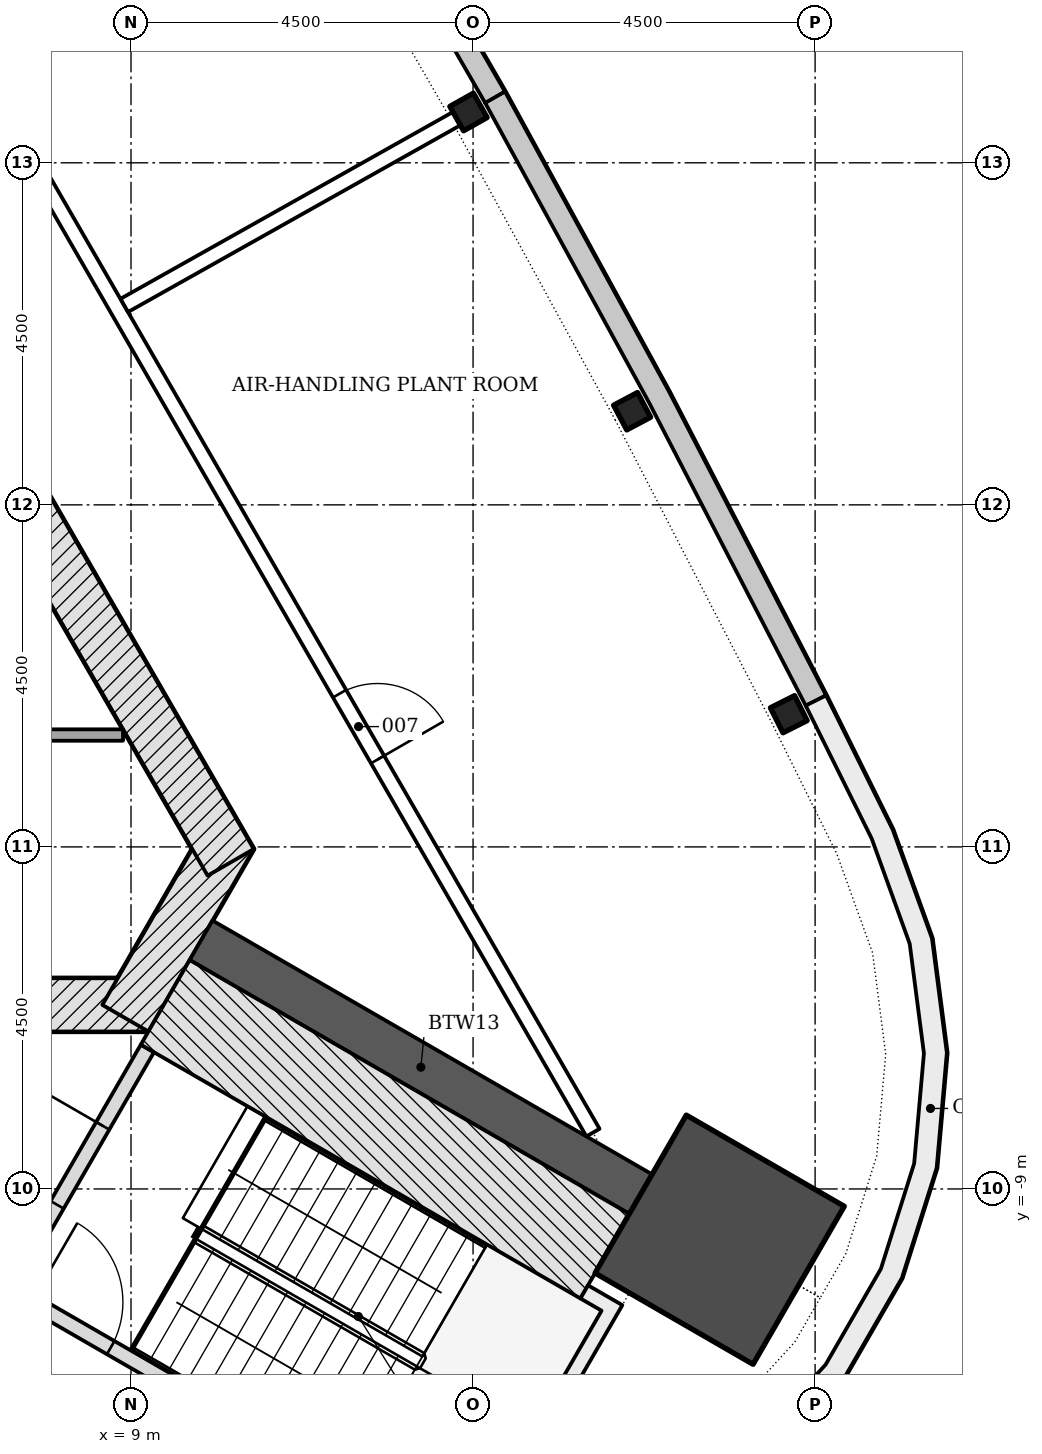
"""IFC4 building model, lengths in metres.
Left out: names, types, materials, properties, quantities, classifications, styles, units other than length and angle.
Written with IfcOpenShell. Run it as: python <this file> out.ifc"""

import sys

from ifc_helpers import new_model, si_unit, direction, frame, frame_2d, origin, origin_2d, place, context, subcontext, project, spatial, polyline, rectangle, i_section, outline, extrude, element, fill, save


model = new_model("IFC4")
c1 = context("Model", 3, precision=1e-05, world=origin(), true_north=direction((0.0, 1.0)))
c2 = subcontext(c1, "Body", "Model", "MODEL_VIEW")
j1 = project(units=[si_unit("LENGTHUNIT", "METRE"), si_unit("PLANEANGLEUNIT", "RADIAN")], contexts=[c1])
p1 = place(None, origin())
s1 = spatial("IfcSite", under=j1, at=p1, CompositionType="ELEMENT")
p2 = place(p1, origin())
s2 = spatial("IfcBuilding", under=s1, at=p2, CompositionType="ELEMENT")
p3 = place(p2, frame((0.0, 0.0, 297.6)))
s3 = spatial("IfcBuildingStorey", under=s2, at=p3, CompositionType="ELEMENT", Elevation=297.6)
p4 = place(p3, frame((-9.229, -6.578, -0.25), z_axis=(0.0, 0.0, 1.0), x_axis=(1.0, 0.0, 0.0)))
e1 = element("IfcWall", 1, at=p4, inside=s3, PredefinedType="SHEAR", context=c2, shape_type="SweptSolid", body=[
    extrude(rectangle(XDim=18.458, YDim=0.7, at=frame_2d((9.229, 0.0))), origin(), (0.0, 0.0, 1.0), 4.5),
])
p5 = place(p4, frame((8.7, 0.0, 0.25)))
e2 = element("IfcOpeningElement", 2, at=p5, cuts=e1, PredefinedType="OPENING", context=c2, shape_type="SweptSolid", body=[
    extrude(rectangle(XDim=1.0, YDim=2.1, at=frame_2d((0.5, 1.05))), frame((0.0, 0.36, 0.0), z_axis=(0.0, -1.0, 0.0), x_axis=(1.0, 0.0, 0.0)), (0.0, 0.0, 1.0), 0.72),
])
p6 = place(p4, frame((3.99, 0.0, 0.25)))
e3 = element("IfcOpeningElement", 3, at=p6, cuts=e1, PredefinedType="OPENING", context=c2, shape_type="SweptSolid", body=[
    extrude(rectangle(XDim=0.9, YDim=2.1, at=frame_2d((0.45, 1.05))), frame((0.0, 0.36, 0.0), z_axis=(0.0, -1.0, 0.0), x_axis=(1.0, 0.0, 0.0)), (0.0, 0.0, 1.0), 0.72),
])
p7 = place(p4, frame((13.539, 0.0, 0.25)))
e4 = element("IfcOpeningElement", 4, at=p7, cuts=e1, PredefinedType="OPENING", context=c2, shape_type="SweptSolid", body=[
    extrude(rectangle(XDim=0.9, YDim=2.1, at=frame_2d((0.45, 1.05))), frame((0.0, 0.36, 0.0), z_axis=(0.0, -1.0, 0.0), x_axis=(1.0, 0.0, 0.0)), (0.0, 0.0, 1.0), 0.72),
])
p8 = place(p3, frame((8.926, -6.753, -0.25), z_axis=(0.0, 0.0, 1.0), x_axis=(0.500042739161, 0.866000726912, 0.0)))
e5 = element("IfcWall", 5, at=p8, inside=s3, PredefinedType="SHEAR", context=c2, shape_type="SweptSolid", body=[
    extrude(rectangle(XDim=2.771, YDim=0.7, at=frame_2d((1.386, 0.0))), origin(), (0.0, 0.0, 1.0), 4.5),
])
p9 = place(p3, frame((10.311, -4.703, -0.25), z_axis=(0.0, 0.0, 1.0), x_axis=(-0.500001446645, 0.866024568562, 0.0)))
e6 = element("IfcWall", 6, at=p9, inside=s3, PredefinedType="SHEAR", context=c2, shape_type="SweptSolid", body=[
    extrude(rectangle(XDim=18.458, YDim=0.7, at=frame_2d((9.229, 0.0))), origin(), (0.0, 0.0, 1.0), 4.5),
])
p10 = place(p3, frame((9.922, -5.728, -0.25), z_axis=(0.0, 0.0, 1.0), x_axis=(0.866032176823, -0.499988268569, 0.0)))
e7 = element("IfcWall", 7, at=p10, inside=s3, PredefinedType="SHEAR", context=c2, shape_type="SweptSolid", body=[
    extrude(rectangle(XDim=6.678, YDim=0.6, at=frame_2d((3.339, 0.0))), origin(), (0.0, 0.0, 1.0), 4.5),
])
p11 = place(p3, frame((16.745, -9.667, -0.25), z_axis=(0.0, 0.0, 1.0), x_axis=(0.866025403784, -0.5, 0.0)))
e8 = element("IfcColumn", 8, at=p11, inside=s3, PredefinedType="COLUMN", context=c2, shape_type="SweptSolid", body=[
    extrude(rectangle(XDim=2.4, YDim=2.4, at=origin_2d()), origin(), (0.0, 0.0, 1.0), 4.5),
])
for number, where, z_axis, x_axis in (
    (9, (17.654, -2.754, -0.25), (0.0, 0.0, 1.0), (-0.449, 0.894, 0.0)),
    (10, (15.593, 1.232, -0.25), (0.0, 0.0, 1.0), (-0.47, 0.883, 0.0)),
    (11, (13.44, 5.169, -0.25), (0.0, 0.0, 1.0), (-0.49, 0.872, 0.0)),
):
    element("IfcColumn", number, at=place(p3, frame(where, z_axis=z_axis, x_axis=x_axis)), inside=s3, PredefinedType="COLUMN", context=c2, shape_type="SweptSolid", body=[
        extrude(i_section(OverallWidth=0.368, OverallDepth=0.356, WebThickness=0.011, FlangeThickness=0.018, FilletRadius=0.015, at=origin_2d()), origin(), (0.0, 0.0, 1.0), 4.5),
    ])
p12 = place(p3, origin())
e12 = element("IfcWall", 12, at=p12, inside=s3, PredefinedType="NOTDEFINED", context=c2, shape_type="SweptSolid", body=[
    extrude(outline(polyline([(18.145, -2.507), (16.078, 1.49), (13.919, 5.438), (13.656, 5.294), (15.813, 1.349), (17.878, -2.645), (18.145, -2.507)])), origin(), (0.0, 0.0, 1.0), 4.25),
])
p13 = place(p3, origin())
e13 = element("IfcWall", 13, at=p13, inside=s3, PredefinedType="NOTDEFINED", context=c2, shape_type="SweptSolid", body=[
    extrude(outline(polyline([(13.919, 5.438), (11.669, 9.335), (11.409, 9.185), (13.659, 5.288), (13.919, 5.438)])), origin(), (0.0, 0.0, 1.0), 1.2),
])
p14 = place(p3, origin())
e14 = element("IfcWall", 14, at=p14, inside=s3, PredefinedType="NOTDEFINED", context=c2, shape_type="SweptSolid", body=[
    extrude(outline(polyline([(11.244, -14.46), (13.211, -14.336), (14.708, -14.069), (16.111, -13.485), (17.355, -12.611), (18.381, -11.49), (19.141, -10.174), (19.599, -8.724), (19.733, -7.21), (19.538, -5.703), (19.021, -4.273), (18.145, -2.507), (17.876, -2.64), (18.745, -4.391), (19.244, -5.774), (19.432, -7.216), (19.303, -8.665), (18.865, -10.052), (18.138, -11.312), (17.156, -12.385), (15.965, -13.22), (14.623, -13.779), (13.176, -14.038), (11.225, -14.161), (11.244, -14.46)])), origin(), (0.0, 0.0, 1.0), 4.25),
])
p15 = place(p3, frame((1.071, -3.028, 0.0), z_axis=(0.0, 0.0, 1.0), x_axis=(1.0, 0.0, 0.0)))
e15 = element("IfcWall", 15, at=p15, inside=s3, PredefinedType="PARTITIONING", context=c2, shape_type="SweptSolid", body=[
    extrude(rectangle(XDim=7.824, YDim=0.15, at=frame_2d((3.912, 0.0))), origin(), (0.0, 0.0, 1.0), 4.25),
])
p16 = place(p3, frame((7.44, -10.226, -0.25), z_axis=(0.0, 0.0, 1.0), x_axis=(0.500022077904, 0.866012656725, 0.0)))
e16 = element("IfcWall", 16, at=p16, inside=s3, PredefinedType="SHEAR", context=c2, shape_type="SweptSolid", body=[
    extrude(rectangle(XDim=3.55, YDim=0.2, at=frame_2d((1.775, 0.0))), origin(), (0.0, 0.0, 1.0), 4.5),
])
p17 = place(p16, frame((1.175, 0.0, 0.25)))
e17 = element("IfcOpeningElement", 17, at=p17, cuts=e16, PredefinedType="OPENING", context=c2, shape_type="SweptSolid", body=[
    extrude(rectangle(XDim=1.2, YDim=2.1, at=frame_2d((0.6, 1.05))), frame((0.0, 0.11, 0.0), z_axis=(0.0, -1.0, 0.0), x_axis=(1.0, 0.0, 0.0)), (0.0, 0.0, 1.0), 0.22),
])
p18 = place(p3, frame((7.304, -10.262, -0.25), z_axis=(0.0, 0.0, 1.0), x_axis=(0.866026594901, -0.49999793692, 0.0)))
e18 = element("IfcWall", 18, at=p18, inside=s3, PredefinedType="SHEAR", context=c2, shape_type="SweptSolid", body=[
    extrude(rectangle(XDim=5.6, YDim=0.2, at=frame_2d((2.8, 0.0))), origin(), (0.0, 0.0, 1.0), 4.5),
])
p19 = place(p18, frame((0.45, 0.0, 0.25)))
e19 = element("IfcOpeningElement", 19, at=p19, cuts=e18, PredefinedType="OPENING", context=c2, shape_type="SweptSolid", body=[
    extrude(rectangle(XDim=1.2, YDim=2.1, at=frame_2d((0.6, 1.05))), frame((0.0, 0.11, 0.0), z_axis=(0.0, -1.0, 0.0), x_axis=(1.0, 0.0, 0.0)), (0.0, 0.0, 1.0), 0.22),
])
p20 = place(p3, frame((9.45, -6.545, -0.25), z_axis=(0.0, 0.0, 1.0), x_axis=(0.866016347338, -0.500015685897, 0.0)))
e20 = element("IfcWall", 20, at=p20, inside=s3, PredefinedType="SHEAR", context=c2, shape_type="SweptSolid", body=[
    extrude(rectangle(XDim=6.678, YDim=1.286, at=frame_2d((3.339, 0.0))), origin(), (0.0, 0.0, 1.0), 4.5),
])
p21 = place(p3, frame((0.0, 0.0, -0.25)))
e21 = element("IfcWall", 21, at=p21, inside=s3, PredefinedType="SHEAR", context=c2, shape_type="SweptSolid", body=[
    extrude(outline(polyline([(12.104, -13.149), (14.289, -12.563), (15.464, -10.528), (15.013, -10.268), (14.913, -10.441), (15.191, -10.601), (14.157, -12.392), (12.132, -12.934), (12.204, -12.976), (12.204, -12.976), (12.204, -12.976), (12.204, -12.976), (12.204, -12.976), (12.204, -12.976), (12.204, -12.976), (12.204, -12.976), (12.204, -12.976), (12.204, -12.976), (12.204, -12.976), (12.204, -12.976), (12.204, -12.976), (12.204, -12.976), (12.204, -12.976), (12.204, -12.976), (12.204, -12.976), (12.104, -13.149)])), origin(), (0.0, 0.0, 1.0), 4.5),
])
p22 = place(p3, frame((5.282, 8.708, 0.0), z_axis=(0.0, 0.0, 1.0), x_axis=(0.500001848211, -0.866024336717, 0.0)))
e22 = element("IfcWall", 22, at=p22, inside=s3, PredefinedType="PARTITIONING", context=c2, shape_type="SweptSolid", body=[
    extrude(rectangle(XDim=19.591, YDim=0.2, at=frame_2d((9.795, 0.0))), origin(), (0.0, 0.0, 1.0), 3.702),
])
p23 = place(p22, frame((12.923, 0.0, 0.0)))
e23 = element("IfcOpeningElement", 23, at=p23, cuts=e22, PredefinedType="OPENING", context=c2, shape_type="SweptSolid", body=[
    extrude(rectangle(XDim=1.0, YDim=2.1, at=frame_2d((0.5, 1.05))), frame((0.0, 0.11, 0.0), z_axis=(0.0, -1.0, 0.0), x_axis=(1.0, 0.0, 0.0)), (0.0, 0.0, 1.0), 0.22),
])
p24 = place(p22, frame((2.444, 0.0, 0.0)))
e24 = element("IfcOpeningElement", 24, at=p24, cuts=e22, PredefinedType="OPENING", context=c2, shape_type="SweptSolid", body=[
    extrude(rectangle(XDim=1.0, YDim=2.1, at=frame_2d((0.5, 1.05))), frame((0.0, 0.11, 0.0), z_axis=(0.0, -1.0, 0.0), x_axis=(1.0, 0.0, 0.0)), (0.0, 0.0, 1.0), 0.22),
])
p25 = place(p3, frame((8.911, 2.624, 0.0), z_axis=(0.0, 0.0, 1.0), x_axis=(0.871756434121, 0.48993950603, 0.0)))
e25 = element("IfcWall", 25, at=p25, inside=s3, PredefinedType="PARTITIONING", context=c2, shape_type="SweptSolid", body=[
    extrude(rectangle(XDim=5.044, YDim=0.2, at=frame_2d((2.522, 0.0))), origin(), (0.0, 0.0, 1.0), 3.702),
])
p26 = place(p17, origin())
e26 = element("IfcDoor", 26, at=p26, inside=s3, OperationType="SINGLE_SWING_RIGHT", PredefinedType="DOOR", context=c2, shape_type="SweptSolid", body=[
    extrude(rectangle(XDim=1.2, YDim=2.1, at=frame_2d((0.6, 1.05))), frame((0.0, 0.025, 0.0), z_axis=(0.0, -1.0, 0.0), x_axis=(1.0, 0.0, 0.0)), (0.0, 0.0, 1.0), 0.05),
])
fill(e17, e26)
p27 = place(p19, origin())
e27 = element("IfcDoor", 27, at=p27, inside=s3, OperationType="SINGLE_SWING_LEFT", PredefinedType="DOOR", context=c2, shape_type="SweptSolid", body=[
    extrude(rectangle(XDim=1.2, YDim=2.1, at=frame_2d((0.6, 1.05))), frame((0.0, 0.025, 0.0), z_axis=(0.0, -1.0, 0.0), x_axis=(1.0, 0.0, 0.0)), (0.0, 0.0, 1.0), 0.05),
])
fill(e19, e27)
p28 = place(p23, origin())
e28 = element("IfcDoor", 28, at=p28, inside=s3, OperationType="SINGLE_SWING_RIGHT", PredefinedType="DOOR", context=c2, shape_type="SweptSolid", body=[
    extrude(rectangle(XDim=1.0, YDim=2.1, at=frame_2d((0.5, 1.05))), frame((0.0, 0.025, 0.0), z_axis=(0.0, -1.0, 0.0), x_axis=(1.0, 0.0, 0.0)), (0.0, 0.0, 1.0), 0.05),
])
fill(e23, e28)
save(model, sys.argv[1])
